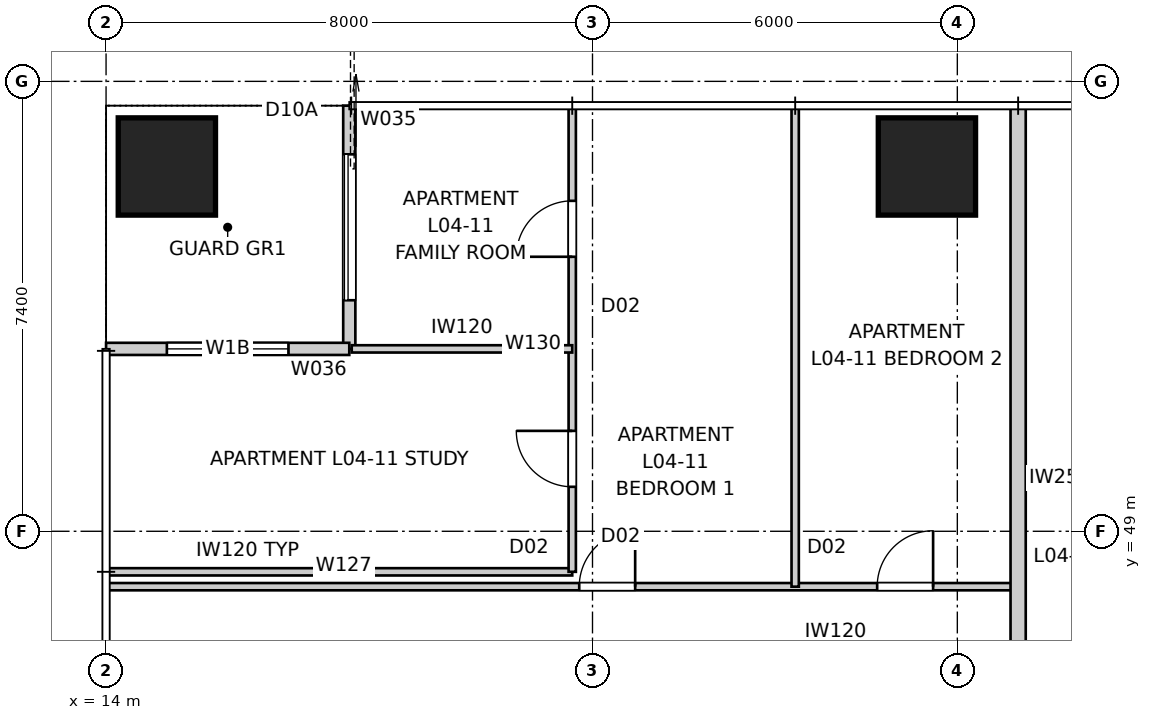
"""IFC4 building model, lengths in metres.
Left out: names, types, materials, properties, quantities, classifications, styles, units other than length and angle.
Written with IfcOpenShell. Run it as: python <this file> out.ifc"""

import sys

from ifc_helpers import new_model, si_unit, direction, frame, frame_2d, origin, origin_2d, place, context, subcontext, project, spatial, rectangle, extrude, element, fill, save


model = new_model("IFC4")
c1 = context("Model", 3, precision=1e-05, world=origin(), true_north=direction((0.0, 1.0)))
c2 = subcontext(c1, "Body", "Model", "MODEL_VIEW")
j1 = project(units=[si_unit("LENGTHUNIT", "METRE"), si_unit("PLANEANGLEUNIT", "RADIAN")], contexts=[c1])
p1 = place(None, origin())
s1 = spatial("IfcSite", under=j1, at=p1, CompositionType="ELEMENT")
p2 = place(p1, origin())
s2 = spatial("IfcBuilding", under=s1, at=p2, CompositionType="ELEMENT")
p3 = place(p2, frame((0.0, 0.0, 18.4)))
s3 = spatial("IfcBuildingStorey", under=s2, at=p3, CompositionType="ELEMENT", Elevation=18.4)
for number, where, z_axis, x_axis in (
    (1, (27.5, 55.0, 0.0), (0.0, 0.0, 1.0), (1.0, 0.0, 0.0)),
    (2, (15.0, 55.0, 0.0), (0.0, 0.0, 1.0), (1.0, 0.0, 0.0)),
):
    element("IfcColumn", number, at=place(p3, frame(where, z_axis=z_axis, x_axis=x_axis)), inside=s3, PredefinedType="COLUMN", context=c2, shape_type="SweptSolid", body=[
        extrude(rectangle(XDim=1.6, YDim=1.6, at=origin_2d()), origin(), (0.0, 0.0, 1.0), 3.4),
    ])
p4 = place(p3, frame((18.0, 56.0, 0.0), z_axis=(0.0, 0.0, 1.0), x_axis=(0.0, -1.0, 0.0)))
e3 = element("IfcWall", 3, at=p4, inside=s3, PredefinedType="SOLIDWALL", context=c2, shape_type="SweptSolid", body=[
    extrude(rectangle(XDim=4.0, YDim=0.2, at=frame_2d((2.0, 0.0))), origin(), (0.0, 0.0, 1.0), 3.25),
])
p5 = place(p4, frame((0.8, 0.0, 0.0)))
e4 = element("IfcOpeningElement", 4, at=p5, cuts=e3, PredefinedType="OPENING", context=c2, shape_type="SweptSolid", body=[
    extrude(rectangle(XDim=2.4, YDim=2.1, at=frame_2d((1.2, 1.05))), frame((0.0, 0.11, 0.0), z_axis=(0.0, -1.0, 0.0), x_axis=(1.0, 0.0, 0.0)), (0.0, 0.0, 1.0), 0.22),
])
p6 = place(p3, frame((18.0, 52.0, 0.0), z_axis=(0.0, 0.0, 1.0), x_axis=(-1.0, 0.0, 0.0)))
e5 = element("IfcWall", 5, at=p6, inside=s3, PredefinedType="SOLIDWALL", context=c2, shape_type="SweptSolid", body=[
    extrude(rectangle(XDim=4.0, YDim=0.2, at=frame_2d((2.0, 0.0))), origin(), (0.0, 0.0, 1.0), 3.25),
])
p7 = place(p6, frame((1.0, 0.0, 0.45)))
e6 = element("IfcOpeningElement", 6, at=p7, cuts=e5, PredefinedType="OPENING", context=c2, shape_type="SweptSolid", body=[
    extrude(rectangle(XDim=2.0, YDim=1.8, at=frame_2d((1.0, 0.9))), frame((0.0, 0.11, 0.0), z_axis=(0.0, -1.0, 0.0), x_axis=(1.0, 0.0, 0.0)), (0.0, 0.0, 1.0), 0.22),
])
p8 = place(p3, frame((29.0, 56.0, 0.0), z_axis=(0.0, 0.0, 1.0), x_axis=(0.0, -1.0, 0.0)))
e7 = element("IfcWall", 7, at=p8, inside=s3, PredefinedType="PARTITIONING", context=c2, shape_type="SweptSolid", body=[
    extrude(rectangle(XDim=12.24, YDim=0.25, at=frame_2d((6.12, 0.0))), origin(), (0.0, 0.0, 1.0), 3.25),
])
p9 = place(p3, frame((14.04, 48.089, 0.0), z_axis=(0.0, 0.0, 1.0), x_axis=(1.0, 0.0, 0.0)))
e8 = element("IfcWall", 8, at=p9, inside=s3, PredefinedType="PARTITIONING", context=c2, shape_type="SweptSolid", body=[
    extrude(rectangle(XDim=14.96, YDim=0.12, at=frame_2d((7.48, 0.0))), origin(), (0.0, 0.0, 1.0), 3.25),
])
p10 = place(p9, frame((7.742, 0.0, 0.0)))
e9 = element("IfcOpeningElement", 9, at=p10, cuts=e8, PredefinedType="OPENING", context=c2, shape_type="SweptSolid", body=[
    extrude(rectangle(XDim=0.92, YDim=2.34, at=frame_2d((0.46, 1.17))), frame((0.0, 0.07, 0.0), z_axis=(0.0, -1.0, 0.0), x_axis=(1.0, 0.0, 0.0)), (0.0, 0.0, 1.0), 0.14),
])
p11 = place(p9, frame((12.642, 0.0, 0.0)))
e10 = element("IfcOpeningElement", 10, at=p11, cuts=e8, PredefinedType="OPENING", context=c2, shape_type="SweptSolid", body=[
    extrude(rectangle(XDim=0.92, YDim=2.34, at=frame_2d((0.46, 1.17))), frame((0.0, 0.07, 0.0), z_axis=(0.0, -1.0, 0.0), x_axis=(1.0, 0.0, 0.0)), (0.0, 0.0, 1.0), 0.14),
])
p12 = place(p3, frame((25.333, 55.96, 0.0), z_axis=(0.0, 0.0, 1.0), x_axis=(0.0, -1.0, 0.0)))
e11 = element("IfcWall", 11, at=p12, inside=s3, PredefinedType="PARTITIONING", context=c2, shape_type="SweptSolid", body=[
    extrude(rectangle(XDim=7.871, YDim=0.12, at=frame_2d((3.936, 0.0))), origin(), (0.0, 0.0, 1.0), 2.638),
])
p13 = place(p3, frame((14.04, 48.333, 0.0), z_axis=(0.0, 0.0, 1.0), x_axis=(1.0, 0.0, 0.0)))
e12 = element("IfcWall", 12, at=p13, inside=s3, PredefinedType="PARTITIONING", context=c2, shape_type="SweptSolid", body=[
    extrude(rectangle(XDim=7.627, YDim=0.12, at=frame_2d((3.813, 0.0))), origin(), (0.0, 0.0, 1.0), 3.25),
])
p14 = place(p3, frame((21.667, 48.333, 0.0), z_axis=(0.0, 0.0, 1.0), x_axis=(0.0, 1.0, 0.0)))
e13 = element("IfcWall", 13, at=p14, inside=s3, PredefinedType="PARTITIONING", context=c2, shape_type="SweptSolid", body=[
    extrude(rectangle(XDim=7.627, YDim=0.12, at=frame_2d((3.813, 0.0))), origin(), (0.0, 0.0, 1.0), 3.25),
])
p15 = place(p14, frame((5.182, 0.0, 0.0)))
e14 = element("IfcOpeningElement", 14, at=p15, cuts=e13, PredefinedType="OPENING", context=c2, shape_type="SweptSolid", body=[
    extrude(rectangle(XDim=0.92, YDim=2.34, at=frame_2d((0.46, 1.17))), frame((0.0, 0.07, 0.0), z_axis=(0.0, -1.0, 0.0), x_axis=(1.0, 0.0, 0.0)), (0.0, 0.0, 1.0), 0.14),
])
p16 = place(p14, frame((1.398, 0.0, 0.0)))
e15 = element("IfcOpeningElement", 15, at=p16, cuts=e13, PredefinedType="OPENING", context=c2, shape_type="SweptSolid", body=[
    extrude(rectangle(XDim=0.92, YDim=2.34, at=frame_2d((0.46, 1.17))), frame((0.0, 0.07, 0.0), z_axis=(0.0, -1.0, 0.0), x_axis=(1.0, 0.0, 0.0)), (0.0, 0.0, 1.0), 0.14),
])
p17 = place(p3, frame((18.04, 52.0, 0.0), z_axis=(0.0, 0.0, 1.0), x_axis=(1.0, 0.0, 0.0)))
e16 = element("IfcWall", 16, at=p17, inside=s3, PredefinedType="PARTITIONING", context=c2, shape_type="SweptSolid", body=[
    extrude(rectangle(XDim=3.627, YDim=0.12, at=frame_2d((1.813, 0.0))), origin(), (0.0, 0.0, 1.0), 3.25),
])
p18 = place(p5, origin())
e17 = element("IfcDoor", 17, at=p18, inside=s3, OperationType="SLIDING_TO_LEFT", PredefinedType="DOOR", context=c2, shape_type="SweptSolid", body=[
    extrude(rectangle(XDim=2.4, YDim=2.1, at=frame_2d((1.2, 1.05))), frame((0.0, 0.025, 0.0), z_axis=(0.0, -1.0, 0.0), x_axis=(1.0, 0.0, 0.0)), (0.0, 0.0, 1.0), 0.05),
])
fill(e4, e17)
p19 = place(p7, origin())
e18 = element("IfcWindow", 18, at=p19, inside=s3, PartitioningType="SINGLE_PANEL", PredefinedType="WINDOW", context=c2, shape_type="SweptSolid", body=[
    extrude(rectangle(XDim=2.0, YDim=1.8, at=frame_2d((1.0, 0.9))), frame((0.0, 0.03, 0.0), z_axis=(0.0, -1.0, 0.0), x_axis=(1.0, 0.0, 0.0)), (0.0, 0.0, 1.0), 0.06),
])
fill(e6, e18)
p20 = place(p10, origin())
e19 = element("IfcDoor", 19, at=p20, inside=s3, OperationType="SINGLE_SWING_RIGHT", PredefinedType="DOOR", context=c2, shape_type="SweptSolid", body=[
    extrude(rectangle(XDim=0.92, YDim=2.34, at=frame_2d((0.46, 1.17))), frame((0.0, 0.025, 0.0), z_axis=(0.0, -1.0, 0.0), x_axis=(1.0, 0.0, 0.0)), (0.0, 0.0, 1.0), 0.05),
])
fill(e9, e19)
p21 = place(p11, origin())
e20 = element("IfcDoor", 20, at=p21, inside=s3, OperationType="SINGLE_SWING_RIGHT", PredefinedType="DOOR", context=c2, shape_type="SweptSolid", body=[
    extrude(rectangle(XDim=0.92, YDim=2.34, at=frame_2d((0.46, 1.17))), frame((0.0, 0.025, 0.0), z_axis=(0.0, -1.0, 0.0), x_axis=(1.0, 0.0, 0.0)), (0.0, 0.0, 1.0), 0.05),
])
fill(e10, e20)
p22 = place(p15, origin())
e21 = element("IfcDoor", 21, at=p22, inside=s3, OperationType="SINGLE_SWING_LEFT", PredefinedType="DOOR", context=c2, shape_type="SweptSolid", body=[
    extrude(rectangle(XDim=0.92, YDim=2.34, at=frame_2d((0.46, 1.17))), frame((0.0, 0.025, 0.0), z_axis=(0.0, -1.0, 0.0), x_axis=(1.0, 0.0, 0.0)), (0.0, 0.0, 1.0), 0.05),
])
fill(e14, e21)
p23 = place(p16, origin())
e22 = element("IfcDoor", 22, at=p23, inside=s3, OperationType="SINGLE_SWING_RIGHT", PredefinedType="DOOR", context=c2, shape_type="SweptSolid", body=[
    extrude(rectangle(XDim=0.92, YDim=2.34, at=frame_2d((0.46, 1.17))), frame((0.0, 0.025, 0.0), z_axis=(0.0, -1.0, 0.0), x_axis=(1.0, 0.0, 0.0)), (0.0, 0.0, 1.0), 0.05),
])
fill(e15, e22)
save(model, sys.argv[1])
